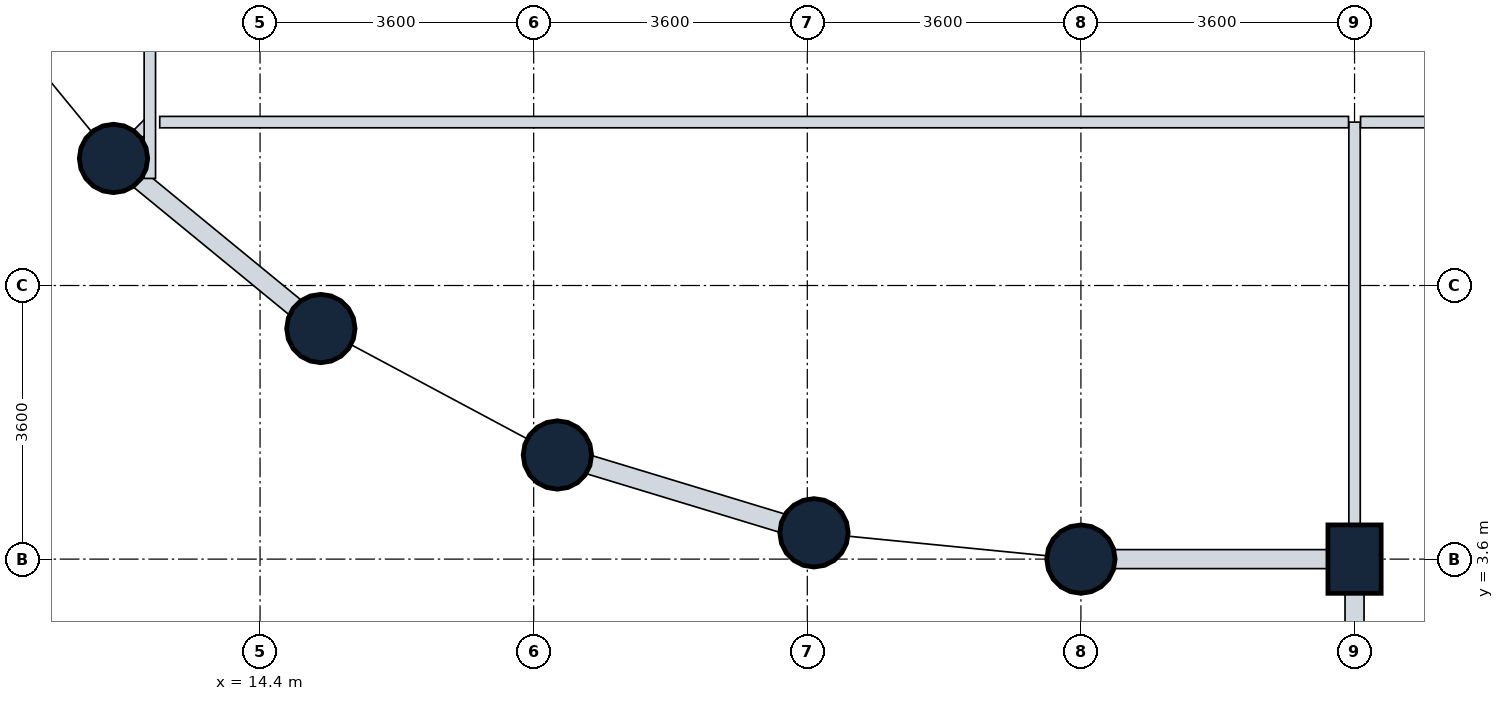
"""IFC4 building model, lengths in metres.
Left out: names, types, materials, properties, quantities, classifications, styles, units other than length and angle.
Written with IfcOpenShell. Run it as: python <this file> out.ifc"""

import sys

from ifc_helpers import new_model, si_unit, direction, frame, frame_2d, origin, origin_2d, place, context, subcontext, project, spatial, rectangle, circle, extrude, element, fill, save


model = new_model("IFC4")
c1 = context("Model", 3, precision=1e-05, world=origin(), true_north=direction((0.0, 1.0)))
c2 = subcontext(c1, "Body", "Model", "MODEL_VIEW")
j1 = project(units=[si_unit("LENGTHUNIT", "METRE"), si_unit("PLANEANGLEUNIT", "RADIAN")], contexts=[c1])
p1 = place(None, origin())
s1 = spatial("IfcSite", under=j1, at=p1, CompositionType="ELEMENT")
p2 = place(p1, origin())
s2 = spatial("IfcBuilding", under=s1, at=p2, CompositionType="ELEMENT")
p3 = place(p2, frame((0.0, 0.0, 209.0)))
s3 = spatial("IfcBuildingStorey", under=s2, at=p3, CompositionType="ELEMENT", Elevation=209.0)
for number, where, z_axis, x_axis in (
    (1, (12.472, 8.872, 0.0), (0.0, 0.0, 1.0), (1.0, 0.0, 0.0)),
    (2, (15.2, 6.634, 0.0), (0.0, 0.0, 1.0), (1.0, 0.0, 0.0)),
    (3, (18.312, 4.97, 0.0), (0.0, 0.0, 1.0), (1.0, 0.0, 0.0)),
    (4, (21.688, 3.946, 0.0), (0.0, 0.0, 1.0), (1.0, 0.0, 0.0)),
    (5, (25.2, 3.6, 0.0), (0.0, 0.0, 1.0), (1.0, 0.0, 0.0)),
):
    element("IfcColumn", number, at=place(p3, frame(where, z_axis=z_axis, x_axis=x_axis)), inside=s3, PredefinedType="COLUMN", context=c2, shape_type="SweptSolid", body=[
        extrude(circle(Radius=0.45, at=origin_2d()), origin(), (0.0, 0.0, 1.0), 4.8),
    ])
p4 = place(p3, frame((28.8, 3.6, 0.0), z_axis=(0.0, 0.0, 1.0), x_axis=(1.0, 0.0, 0.0)))
e6 = element("IfcColumn", 6, at=p4, inside=s3, PredefinedType="COLUMN", context=c2, shape_type="SweptSolid", body=[
    extrude(rectangle(XDim=0.7, YDim=0.9, at=origin_2d()), origin(), (0.0, 0.0, 1.0), 4.8),
])
p5 = place(p3, frame((28.8, 3.6, 0.0), z_axis=(0.0, 0.0, 1.0), x_axis=(-1.0, 0.0, 0.0)))
e7 = element("IfcWall", 7, at=p5, inside=s3, PredefinedType="STANDARD", context=c2, shape_type="SweptSolid", body=[
    extrude(rectangle(XDim=3.6, YDim=0.25, at=frame_2d((1.8, 0.0))), origin(), (0.0, 0.0, 1.0), 3.93),
])
p6 = place(p5, frame((0.75, 0.0, 0.85)))
e8 = element("IfcOpeningElement", 8, at=p6, cuts=e7, PredefinedType="OPENING", context=c2, shape_type="SweptSolid", body=[
    extrude(rectangle(XDim=2.1, YDim=1.35, at=frame_2d((1.05, 0.675))), frame((0.0, 0.135, 0.0), z_axis=(0.0, -1.0, 0.0), x_axis=(1.0, 0.0, 0.0)), (0.0, 0.0, 1.0), 0.27),
])
p7 = place(p3, frame((28.8, 3.6, 0.0), z_axis=(0.0, 0.0, 1.0), x_axis=(0.0, -1.0, 0.0)))
e9 = element("IfcWall", 9, at=p7, inside=s3, PredefinedType="STANDARD", context=c2, shape_type="SweptSolid", body=[
    extrude(rectangle(XDim=2.1, YDim=0.25, at=frame_2d((1.05, 0.0))), origin(), (0.0, 0.0, 1.0), 3.93),
])
p8 = place(p3, frame((15.2, 6.634, 0.0), z_axis=(0.0, 0.0, 1.0), x_axis=(-0.773121216285, 0.634258295121, 0.0)))
e10 = element("IfcWall", 10, at=p8, inside=s3, PredefinedType="STANDARD", context=c2, shape_type="SweptSolid", body=[
    extrude(rectangle(XDim=3.529, YDim=0.25, at=frame_2d((1.764, 0.0))), origin(), (0.0, 0.0, 1.0), 3.93),
])
p9 = place(p8, frame((0.964, 0.0, 0.85)))
e11 = element("IfcOpeningElement", 11, at=p9, cuts=e10, PredefinedType="OPENING", context=c2, shape_type="SweptSolid", body=[
    extrude(rectangle(XDim=1.6, YDim=1.35, at=frame_2d((0.8, 0.675))), frame((0.0, 0.135, 0.0), z_axis=(0.0, -1.0, 0.0), x_axis=(1.0, 0.0, 0.0)), (0.0, 0.0, 1.0), 0.27),
])
p10 = place(p3, frame((21.688, 3.946, 0.0), z_axis=(0.0, 0.0, 1.0), x_axis=(-0.956953367403, 0.290241714123, 0.0)))
e12 = element("IfcWall", 12, at=p10, inside=s3, PredefinedType="STANDARD", context=c2, shape_type="SweptSolid", body=[
    extrude(rectangle(XDim=3.528, YDim=0.25, at=frame_2d((1.764, 0.0))), origin(), (0.0, 0.0, 1.0), 3.93),
])
p11 = place(p10, frame((0.964, 0.0, 0.85)))
e13 = element("IfcOpeningElement", 13, at=p11, cuts=e12, PredefinedType="OPENING", context=c2, shape_type="SweptSolid", body=[
    extrude(rectangle(XDim=1.6, YDim=1.35, at=frame_2d((0.8, 0.675))), frame((0.0, 0.135, 0.0), z_axis=(0.0, -1.0, 0.0), x_axis=(1.0, 0.0, 0.0)), (0.0, 0.0, 1.0), 0.27),
])
p12 = place(p3, frame((28.8, 9.35, 0.0), z_axis=(0.0, 0.0, 1.0), x_axis=(0.0, -1.0, 0.0)))
e14 = element("IfcWall", 14, at=p12, inside=s3, PredefinedType="PARTITIONING", context=c2, shape_type="SweptSolid", body=[
    extrude(rectangle(XDim=5.621, YDim=0.15, at=frame_2d((2.811, 0.0))), origin(), (0.0, 0.0, 1.0), 4.535),
])
p13 = place(p3, frame((12.95, 9.35, 0.0), z_axis=(0.0, 0.0, 1.0), x_axis=(-0.706883613527, -0.707329878435, 0.0)))
e15 = element("IfcWall", 15, at=p13, inside=s3, PredefinedType="PARTITIONING", context=c2, shape_type="SweptSolid", body=[
    extrude(rectangle(XDim=0.547, YDim=0.15, at=frame_2d((0.273, 0.0))), origin(), (0.0, 0.0, 1.0), 4.26),
])
p14 = place(p3, frame((12.95, 8.609, 0.0), z_axis=(0.0, 0.0, 1.0), x_axis=(0.0, 1.0, 0.0)))
e16 = element("IfcWall", 16, at=p14, inside=s3, PredefinedType="PARTITIONING", context=c2, shape_type="SweptSolid", body=[
    extrude(rectangle(XDim=16.512, YDim=0.15, at=frame_2d((8.256, 0.0))), origin(), (0.0, 0.0, 1.0), 3.93),
])
p15 = place(p14, frame((7.731, 0.0, 0.0)))
e17 = element("IfcOpeningElement", 17, at=p15, cuts=e16, PredefinedType="OPENING", context=c2, shape_type="SweptSolid", body=[
    extrude(rectangle(XDim=1.0, YDim=2.1, at=frame_2d((0.5, 1.05))), frame((0.0, 0.085, 0.0), z_axis=(0.0, -1.0, 0.0), x_axis=(1.0, 0.0, 0.0)), (0.0, 0.0, 1.0), 0.17),
])
p16 = place(p3, frame((13.08, 9.35, 0.0), z_axis=(0.0, 0.0, 1.0), x_axis=(1.0, 0.0, 0.0)))
e18 = element("IfcWall", 18, at=p16, inside=s3, PredefinedType="PARTITIONING", context=c2, shape_type="SweptSolid", body=[
    extrude(rectangle(XDim=15.641, YDim=0.15, at=frame_2d((7.82, 0.0))), origin(), (0.0, 0.0, 1.0), 4.22),
])
p17 = place(p16, frame((4.706, 0.0, 0.0)))
e19 = element("IfcOpeningElement", 19, at=p17, cuts=e18, PredefinedType="OPENING", context=c2, shape_type="SweptSolid", body=[
    extrude(rectangle(XDim=1.0, YDim=2.1, at=frame_2d((0.5, 1.05))), frame((0.0, 0.085, 0.0), z_axis=(0.0, -1.0, 0.0), x_axis=(1.0, 0.0, 0.0)), (0.0, 0.0, 1.0), 0.17),
])
p18 = place(p3, frame((28.879, 9.35, 0.0), z_axis=(0.0, 0.0, 1.0), x_axis=(1.0, 0.0, 0.0)))
e20 = element("IfcWall", 20, at=p18, inside=s3, PredefinedType="PARTITIONING", context=c2, shape_type="SweptSolid", body=[
    extrude(rectangle(XDim=5.521, YDim=0.15, at=frame_2d((2.76, 0.0))), origin(), (0.0, 0.0, 1.0), 4.535),
])
p19 = place(p18, frame((0.36, 0.0, 0.0)))
e21 = element("IfcOpeningElement", 21, at=p19, cuts=e20, PredefinedType="OPENING", context=c2, shape_type="SweptSolid", body=[
    extrude(rectangle(XDim=1.0, YDim=2.1, at=frame_2d((0.5, 1.05))), frame((0.0, 0.085, 0.0), z_axis=(0.0, -1.0, 0.0), x_axis=(1.0, 0.0, 0.0)), (0.0, 0.0, 1.0), 0.17),
])
p20 = place(p6, origin())
e22 = element("IfcWindow", 22, at=p20, inside=s3, PartitioningType="SINGLE_PANEL", PredefinedType="WINDOW", context=c2, shape_type="SweptSolid", body=[
    extrude(rectangle(XDim=2.1, YDim=1.35, at=frame_2d((1.05, 0.675))), frame((0.0, 0.03, 0.0), z_axis=(0.0, -1.0, 0.0), x_axis=(1.0, 0.0, 0.0)), (0.0, 0.0, 1.0), 0.06),
])
fill(e8, e22)
p21 = place(p9, origin())
e23 = element("IfcWindow", 23, at=p21, inside=s3, PartitioningType="SINGLE_PANEL", PredefinedType="WINDOW", context=c2, shape_type="SweptSolid", body=[
    extrude(rectangle(XDim=1.6, YDim=1.35, at=frame_2d((0.8, 0.675))), frame((0.0, 0.03, 0.0), z_axis=(0.0, -1.0, 0.0), x_axis=(1.0, 0.0, 0.0)), (0.0, 0.0, 1.0), 0.06),
])
fill(e11, e23)
p22 = place(p11, origin())
e24 = element("IfcWindow", 24, at=p22, inside=s3, PartitioningType="SINGLE_PANEL", PredefinedType="WINDOW", context=c2, shape_type="SweptSolid", body=[
    extrude(rectangle(XDim=1.6, YDim=1.35, at=frame_2d((0.8, 0.675))), frame((0.0, 0.03, 0.0), z_axis=(0.0, -1.0, 0.0), x_axis=(1.0, 0.0, 0.0)), (0.0, 0.0, 1.0), 0.06),
])
fill(e13, e24)
p23 = place(p17, origin())
e25 = element("IfcDoor", 25, at=p23, inside=s3, OperationType="SINGLE_SWING_RIGHT", PredefinedType="DOOR", context=c2, shape_type="SweptSolid", body=[
    extrude(rectangle(XDim=1.0, YDim=2.1, at=frame_2d((0.5, 1.05))), frame((0.0, 0.025, 0.0), z_axis=(0.0, -1.0, 0.0), x_axis=(1.0, 0.0, 0.0)), (0.0, 0.0, 1.0), 0.05),
])
fill(e19, e25)
p24 = place(p19, origin())
e26 = element("IfcDoor", 26, at=p24, inside=s3, OperationType="SINGLE_SWING_LEFT", PredefinedType="DOOR", context=c2, shape_type="SweptSolid", body=[
    extrude(rectangle(XDim=1.0, YDim=2.1, at=frame_2d((0.5, 1.05))), frame((0.0, 0.025, 0.0), z_axis=(0.0, -1.0, 0.0), x_axis=(1.0, 0.0, 0.0)), (0.0, 0.0, 1.0), 0.05),
])
fill(e21, e26)
save(model, sys.argv[1])
